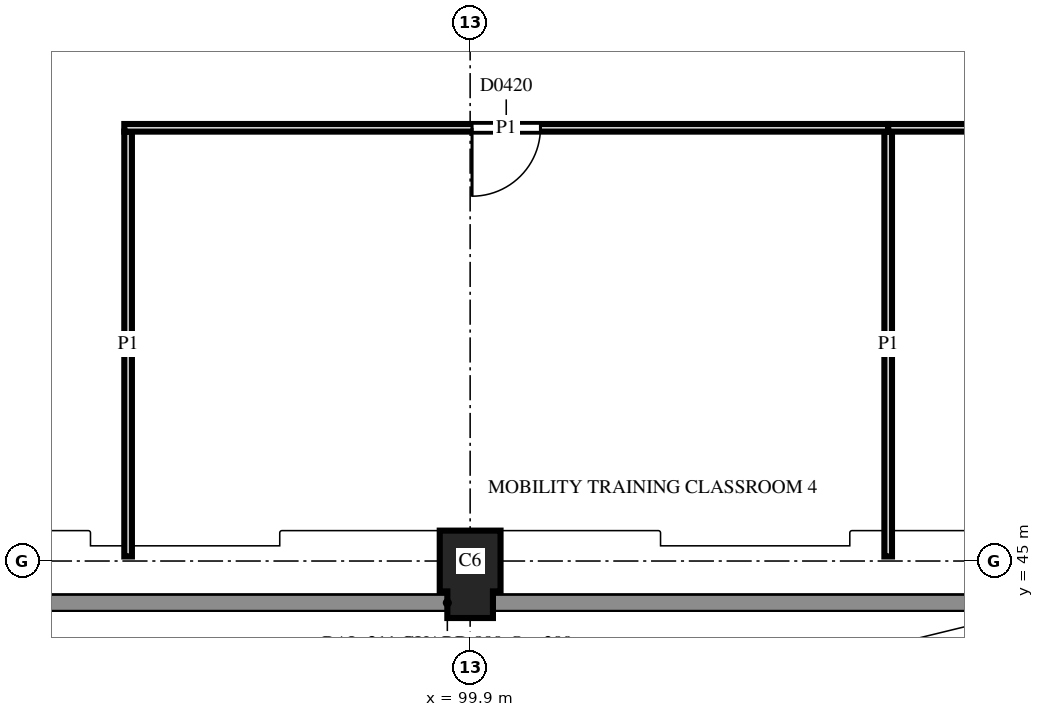
"""IFC4 building model, lengths in metres.
Left out: names, types, materials, properties, quantities, classifications, styles, units other than length and angle.
Written with IfcOpenShell. Run it as: python <this file> out.ifc"""

import sys

from ifc_helpers import new_model, si_unit, direction, frame, frame_2d, origin, place, context, subcontext, project, spatial, polyline, rectangle, outline, extrude, element, fill, save


model = new_model("IFC4")
c1 = context("Model", 3, precision=1e-05, world=origin(), true_north=direction((0.0, 1.0)))
c2 = subcontext(c1, "Body", "Model", "MODEL_VIEW")
j1 = project(units=[si_unit("LENGTHUNIT", "METRE"), si_unit("PLANEANGLEUNIT", "RADIAN")], contexts=[c1])
p1 = place(None, origin())
s1 = spatial("IfcSite", under=j1, at=p1, CompositionType="ELEMENT")
p2 = place(p1, origin())
s2 = spatial("IfcBuilding", under=s1, at=p2, CompositionType="ELEMENT")
p3 = place(p2, frame((0.0, 0.0, 15.6)))
s3 = spatial("IfcBuildingStorey", under=s2, at=p3, CompositionType="ELEMENT", Elevation=15.6)
p4 = place(p3, frame((99.9, 45.0, 0.0), z_axis=(0.0, 0.0, 1.0), x_axis=(0.0, -1.0, 0.0)))
e1 = element("IfcColumn", 1, at=p4, inside=s3, PredefinedType="COLUMN", context=c2, shape_type="SweptSolid", body=[
    extrude(outline(polyline([(-0.4, -0.4), (0.4, -0.4), (0.4, -0.3), (0.75, -0.3), (0.75, 0.3), (0.4, 0.3), (0.4, 0.4), (-0.4, 0.4), (-0.4, -0.4)])), origin(), (0.0, 0.0, 1.0), 3.7),
])
for number, where, z_axis, x_axis in (
    (2, (95.4, 50.65, 0.0), (0.0, 0.0, 1.0), (0.0, -1.0, 0.0)),
    (3, (105.4, 50.65, 0.0), (0.0, 0.0, 1.0), (0.0, -1.0, 0.0)),
):
    element("IfcWall", number, at=place(p3, frame(where, z_axis=z_axis, x_axis=x_axis)), inside=s3, PredefinedType="PARTITIONING", context=c2, shape_type="SweptSolid", body=[
        extrude(rectangle(XDim=5.59, YDim=0.1, at=frame_2d((2.795, 0.0))), origin(), (0.0, 0.0, 1.0), 2.88),
    ])
p5 = place(p3, frame((105.4, 50.7, 0.0), z_axis=(0.0, 0.0, 1.0), x_axis=(-1.0, 0.0, 0.0)))
e4 = element("IfcWall", 4, at=p5, inside=s3, PredefinedType="PARTITIONING", context=c2, shape_type="SweptSolid", body=[
    extrude(rectangle(XDim=10.05, YDim=0.1, at=frame_2d((5.025, 0.0))), origin(), (0.0, 0.0, 1.0), 2.88),
])
p6 = place(p5, frame((4.575, 0.0, 0.0)))
e5 = element("IfcOpeningElement", 5, at=p6, cuts=e4, PredefinedType="OPENING", context=c2, shape_type="SweptSolid", body=[
    extrude(rectangle(XDim=0.9, YDim=2.1, at=frame_2d((0.45, 1.05))), frame((0.0, 0.06, 0.0), z_axis=(0.0, -1.0, 0.0), x_axis=(1.0, 0.0, 0.0)), (0.0, 0.0, 1.0), 0.12),
])
p7 = place(p3, frame((115.4, 50.7, 0.0), z_axis=(0.0, 0.0, 1.0), x_axis=(-1.0, 0.0, 0.0)))
e6 = element("IfcWall", 6, at=p7, inside=s3, PredefinedType="PARTITIONING", context=c2, shape_type="SweptSolid", body=[
    extrude(rectangle(XDim=10.0, YDim=0.1, at=frame_2d((5.0, 0.0))), origin(), (0.0, 0.0, 1.0), 2.88),
])
p8 = place(p7, frame((4.55, 0.0, 0.0)))
e7 = element("IfcOpeningElement", 7, at=p8, cuts=e6, PredefinedType="OPENING", context=c2, shape_type="SweptSolid", body=[
    extrude(rectangle(XDim=0.9, YDim=2.1, at=frame_2d((0.45, 1.05))), frame((0.0, 0.06, 0.0), z_axis=(0.0, -1.0, 0.0), x_axis=(1.0, 0.0, 0.0)), (0.0, 0.0, 1.0), 0.12),
])
p9 = place(p6, origin())
e8 = element("IfcDoor", 8, at=p9, inside=s3, OperationType="SINGLE_SWING_LEFT", PredefinedType="DOOR", context=c2, shape_type="SweptSolid", body=[
    extrude(rectangle(XDim=0.9, YDim=2.1, at=frame_2d((0.45, 1.05))), frame((0.0, 0.025, 0.0), z_axis=(0.0, -1.0, 0.0), x_axis=(1.0, 0.0, 0.0)), (0.0, 0.0, 1.0), 0.05),
])
fill(e5, e8)
save(model, sys.argv[1])
